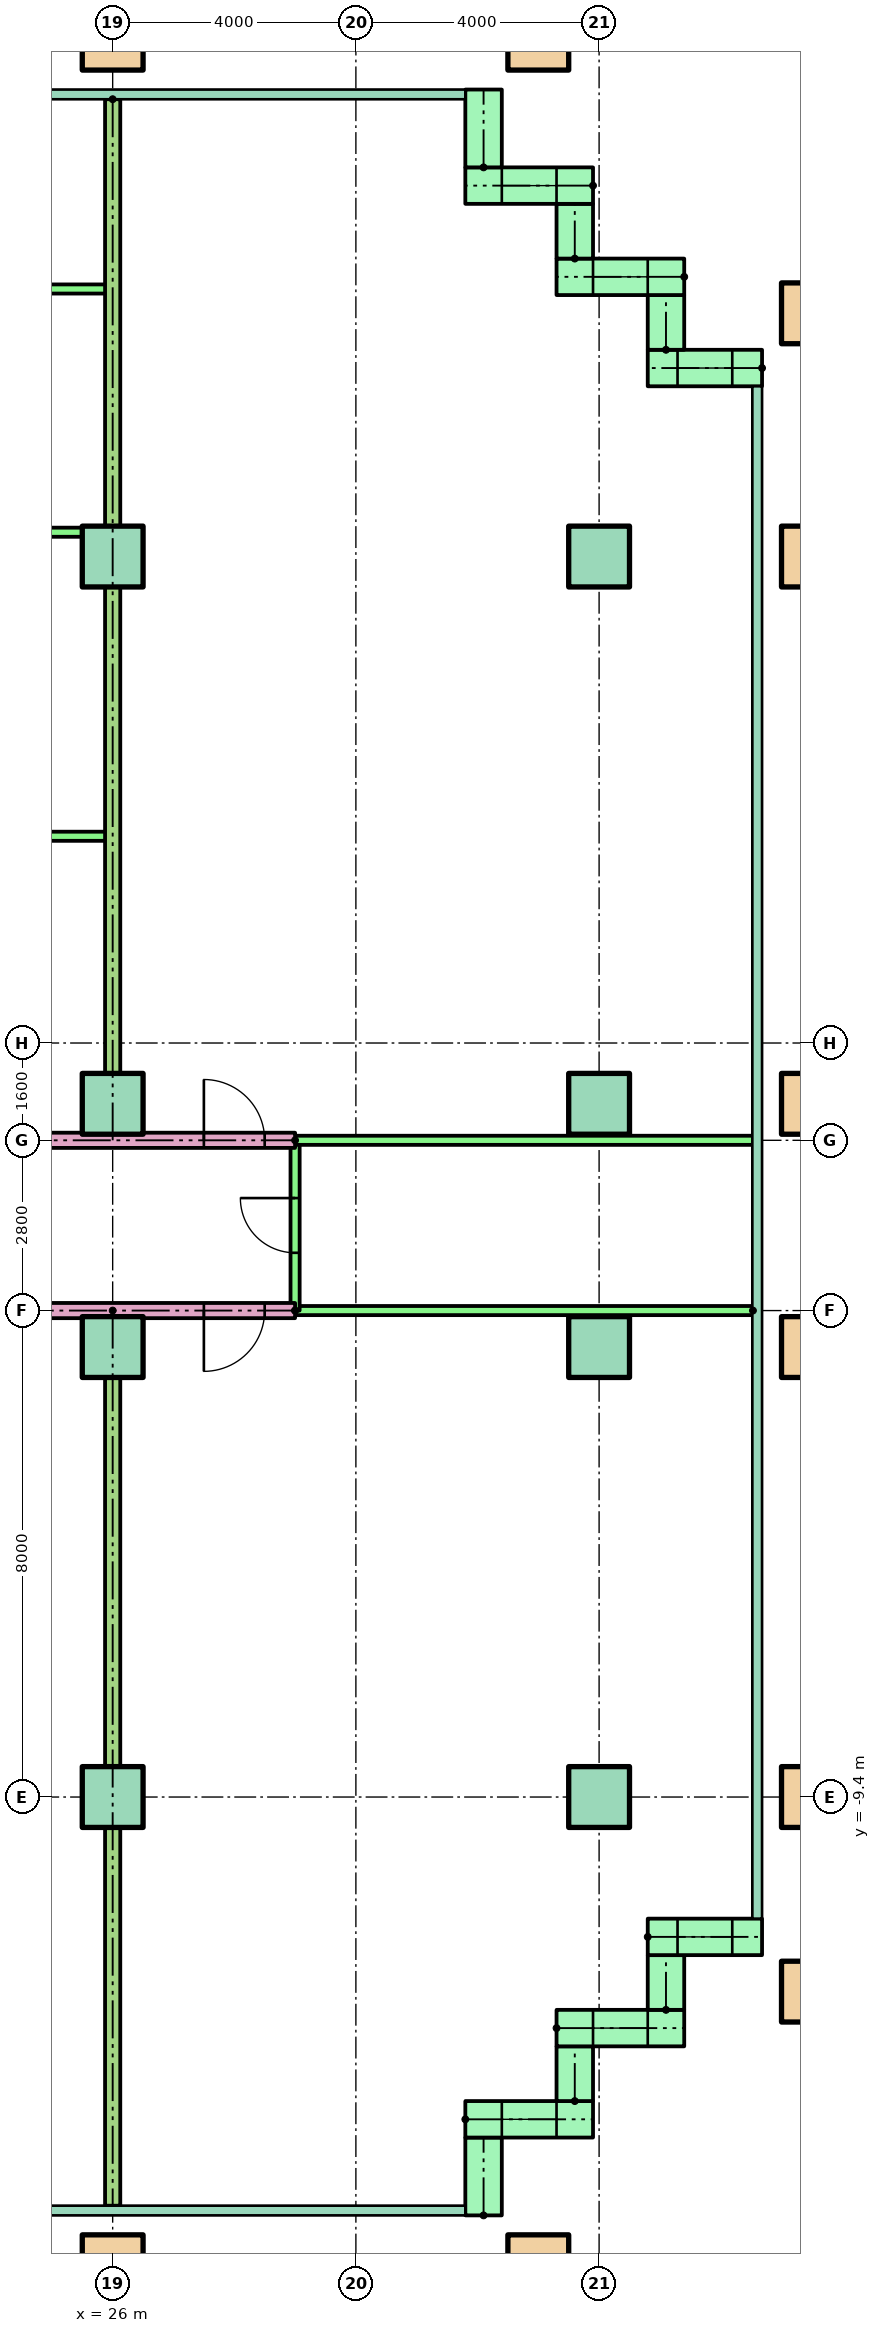
"""IFC4 building model, lengths in metres.
Left out: names, types, materials, properties, quantities, classifications, styles, units other than length and angle.
Written with IfcOpenShell. Run it as: python <this file> out.ifc"""

import sys

from ifc_helpers import new_model, si_unit, direction, frame, frame_2d, origin, origin_2d, place, context, subcontext, project, spatial, rectangle, hollow_rectangle, extrude, element, fill, save


model = new_model("IFC4")
c1 = context("Model", 3, precision=1e-05, world=origin(), true_north=direction((0.0, 1.0)))
c2 = subcontext(c1, "Body", "Model", "MODEL_VIEW")
j1 = project(units=[si_unit("LENGTHUNIT", "METRE"), si_unit("PLANEANGLEUNIT", "RADIAN")], contexts=[c1])
p1 = place(None, origin())
s1 = spatial("IfcSite", under=j1, at=p1, CompositionType="ELEMENT")
p2 = place(p1, origin())
s2 = spatial("IfcBuilding", under=s1, at=p2, CompositionType="ELEMENT")
p3 = place(p2, frame((0.0, 0.0, 33.8)))
s3 = spatial("IfcBuildingStorey", under=s2, at=p3, CompositionType="ELEMENT", Elevation=33.8)
for number, where in (
    (1, (26.0, -17.1, 0.0)),
    (2, (33.0, -17.1, 0.0)),
    (3, (37.5, -12.6, 0.0)),
):
    element("IfcColumn", number, at=place(p3, frame(where)), inside=s3, PredefinedType="COLUMN", context=c2, shape_type="SweptSolid", body=[
        extrude(hollow_rectangle(XDim=1.0, YDim=1.0, WallThickness=0.05, at=origin_2d()), origin(), (0.0, 0.0, 1.0), 3.9),
    ])
for number, where in (
    (4, (26.0, -9.4, 0.0)),
    (5, (34.0, -9.4, 0.0)),
):
    element("IfcColumn", number, at=place(p3, frame(where)), inside=s3, PredefinedType="COLUMN", context=c2, shape_type="SweptSolid", body=[
        extrude(rectangle(XDim=1.0, YDim=1.0, at=origin_2d()), origin(), (0.0, 0.0, 1.0), 3.9),
    ])
p4 = place(p3, frame((37.5, -9.4, 0.0)))
e6 = element("IfcColumn", 6, at=p4, inside=s3, PredefinedType="COLUMN", context=c2, shape_type="SweptSolid", body=[
    extrude(hollow_rectangle(XDim=1.0, YDim=1.0, WallThickness=0.05, at=origin_2d()), origin(), (0.0, 0.0, 1.0), 3.9),
])
for number, where in (
    (7, (26.0, -2.0, 0.0)),
    (8, (34.0, -2.0, 0.0)),
):
    element("IfcColumn", number, at=place(p3, frame(where)), inside=s3, PredefinedType="COLUMN", context=c2, shape_type="SweptSolid", body=[
        extrude(rectangle(XDim=1.0, YDim=1.0, at=origin_2d()), origin(), (0.0, 0.0, 1.0), 3.9),
    ])
p5 = place(p3, frame((37.5, -2.0, 0.0)))
e9 = element("IfcColumn", 9, at=p5, inside=s3, PredefinedType="COLUMN", context=c2, shape_type="SweptSolid", body=[
    extrude(hollow_rectangle(XDim=1.0, YDim=1.0, WallThickness=0.05, at=origin_2d()), origin(), (0.0, 0.0, 1.0), 3.9),
])
for number, where in (
    (10, (26.0, 2.0, 0.0)),
    (11, (34.0, 2.0, 0.0)),
):
    element("IfcColumn", number, at=place(p3, frame(where)), inside=s3, PredefinedType="COLUMN", context=c2, shape_type="SweptSolid", body=[
        extrude(rectangle(XDim=1.0, YDim=1.0, at=origin_2d()), origin(), (0.0, 0.0, 1.0), 3.9),
    ])
p6 = place(p3, frame((37.5, 2.0, 0.0)))
e12 = element("IfcColumn", 12, at=p6, inside=s3, PredefinedType="COLUMN", context=c2, shape_type="SweptSolid", body=[
    extrude(hollow_rectangle(XDim=1.0, YDim=1.0, WallThickness=0.05, at=origin_2d()), origin(), (0.0, 0.0, 1.0), 3.9),
])
for number, where in (
    (13, (26.0, 11.0, 0.0)),
    (14, (34.0, 11.0, 0.0)),
):
    element("IfcColumn", number, at=place(p3, frame(where)), inside=s3, PredefinedType="COLUMN", context=c2, shape_type="SweptSolid", body=[
        extrude(rectangle(XDim=1.0, YDim=1.0, at=origin_2d()), origin(), (0.0, 0.0, 1.0), 3.9),
    ])
for number, where in (
    (15, (37.5, 11.0, 0.0)),
    (16, (37.5, 15.0, 0.0)),
    (17, (26.0, 19.5, 0.0)),
    (18, (33.0, 19.5, 0.0)),
):
    element("IfcColumn", number, at=place(p3, frame(where)), inside=s3, PredefinedType="COLUMN", context=c2, shape_type="SweptSolid", body=[
        extrude(hollow_rectangle(XDim=1.0, YDim=1.0, WallThickness=0.05, at=origin_2d()), origin(), (0.0, 0.0, 1.0), 3.9),
    ])
p7 = place(p3, frame((36.68, 14.1, 0.0), z_axis=(0.0, 0.0, 1.0), x_axis=(-1.0, 0.0, 0.0)))
e19 = element("IfcWall", 19, at=p7, inside=s3, PredefinedType="STANDARD", context=c2, shape_type="SweptSolid", body=[
    extrude(rectangle(XDim=1.88, YDim=0.6, at=frame_2d((0.94, 0.0))), origin(), (0.0, 0.0, 1.0), 3.6),
])
p8 = place(p7, frame((0.49, 0.0, 0.9)))
e20 = element("IfcOpeningElement", 20, at=p8, cuts=e19, PredefinedType="OPENING", context=c2, shape_type="SweptSolid", body=[
    extrude(rectangle(XDim=0.9, YDim=1.8, at=frame_2d((0.45, 0.9))), frame((0.0, 0.31, 0.0), z_axis=(0.0, -1.0, 0.0), x_axis=(1.0, 0.0, 0.0)), (0.0, 0.0, 1.0), 0.62),
])
p9 = place(p3, frame((35.1, 14.4, 0.0), z_axis=(0.0, 0.0, 1.0), x_axis=(0.0, 1.0, 0.0)))
e21 = element("IfcWall", 21, at=p9, inside=s3, PredefinedType="STANDARD", context=c2, shape_type="SweptSolid", body=[
    extrude(rectangle(XDim=0.9, YDim=0.6, at=frame_2d((0.45, 0.0))), origin(), (0.0, 0.0, 1.0), 3.6),
])
p10 = place(p3, frame((35.4, 15.6, 0.0), z_axis=(0.0, 0.0, 1.0), x_axis=(-1.0, 0.0, 0.0)))
e22 = element("IfcWall", 22, at=p10, inside=s3, PredefinedType="STANDARD", context=c2, shape_type="SweptSolid", body=[
    extrude(rectangle(XDim=2.1, YDim=0.6, at=frame_2d((1.05, 0.0))), origin(), (0.0, 0.0, 1.0), 3.6),
])
p11 = place(p10, frame((0.6, 0.0, 0.9)))
e23 = element("IfcOpeningElement", 23, at=p11, cuts=e22, PredefinedType="OPENING", context=c2, shape_type="SweptSolid", body=[
    extrude(rectangle(XDim=0.9, YDim=1.8, at=frame_2d((0.45, 0.9))), frame((0.0, 0.31, 0.0), z_axis=(0.0, -1.0, 0.0), x_axis=(1.0, 0.0, 0.0)), (0.0, 0.0, 1.0), 0.62),
])
p12 = place(p3, frame((33.6, 15.9, 0.0), z_axis=(0.0, 0.0, 1.0), x_axis=(0.0, 1.0, 0.0)))
e24 = element("IfcWall", 24, at=p12, inside=s3, PredefinedType="STANDARD", context=c2, shape_type="SweptSolid", body=[
    extrude(rectangle(XDim=0.9, YDim=0.6, at=frame_2d((0.45, 0.0))), origin(), (0.0, 0.0, 1.0), 3.6),
])
p13 = place(p3, frame((33.9, 17.1, 0.0), z_axis=(0.0, 0.0, 1.0), x_axis=(-1.0, 0.0, 0.0)))
e25 = element("IfcWall", 25, at=p13, inside=s3, PredefinedType="STANDARD", context=c2, shape_type="SweptSolid", body=[
    extrude(rectangle(XDim=2.1, YDim=0.6, at=frame_2d((1.05, 0.0))), origin(), (0.0, 0.0, 1.0), 3.6),
])
p14 = place(p13, frame((0.6, 0.0, 0.9)))
e26 = element("IfcOpeningElement", 26, at=p14, cuts=e25, PredefinedType="OPENING", context=c2, shape_type="SweptSolid", body=[
    extrude(rectangle(XDim=0.9, YDim=1.8, at=frame_2d((0.45, 0.9))), frame((0.0, 0.31, 0.0), z_axis=(0.0, -1.0, 0.0), x_axis=(1.0, 0.0, 0.0)), (0.0, 0.0, 1.0), 0.62),
])
for number, where, z_axis, x_axis in (
    (27, (32.1, 17.4, 0.0), (0.0, 0.0, 1.0), (0.0, 1.0, 0.0)),
    (28, (32.1, -16.28, 0.0), (0.0, 0.0, 1.0), (0.0, 1.0, 0.0)),
):
    element("IfcWall", number, at=place(p3, frame(where, z_axis=z_axis, x_axis=x_axis)), inside=s3, PredefinedType="STANDARD", context=c2, shape_type="SweptSolid", body=[
        extrude(rectangle(XDim=1.28, YDim=0.6, at=frame_2d((0.64, 0.0))), origin(), (0.0, 0.0, 1.0), 3.6),
    ])
p15 = place(p3, frame((31.8, -14.7, 0.0)))
e29 = element("IfcWall", 29, at=p15, inside=s3, PredefinedType="STANDARD", context=c2, shape_type="SweptSolid", body=[
    extrude(rectangle(XDim=2.1, YDim=0.6, at=frame_2d((1.05, 0.0))), origin(), (0.0, 0.0, 1.0), 3.6),
])
p16 = place(p15, frame((0.6, 0.0, 0.9)))
e30 = element("IfcOpeningElement", 30, at=p16, cuts=e29, PredefinedType="OPENING", context=c2, shape_type="SweptSolid", body=[
    extrude(rectangle(XDim=0.9, YDim=1.8, at=frame_2d((0.45, 0.9))), frame((0.0, 0.31, 0.0), z_axis=(0.0, -1.0, 0.0), x_axis=(1.0, 0.0, 0.0)), (0.0, 0.0, 1.0), 0.62),
])
p17 = place(p3, frame((33.6, -14.4, 0.0), z_axis=(0.0, 0.0, 1.0), x_axis=(0.0, 1.0, 0.0)))
e31 = element("IfcWall", 31, at=p17, inside=s3, PredefinedType="STANDARD", context=c2, shape_type="SweptSolid", body=[
    extrude(rectangle(XDim=0.9, YDim=0.6, at=frame_2d((0.45, 0.0))), origin(), (0.0, 0.0, 1.0), 3.6),
])
p18 = place(p3, frame((33.3, -13.2, 0.0)))
e32 = element("IfcWall", 32, at=p18, inside=s3, PredefinedType="STANDARD", context=c2, shape_type="SweptSolid", body=[
    extrude(rectangle(XDim=2.1, YDim=0.6, at=frame_2d((1.05, 0.0))), origin(), (0.0, 0.0, 1.0), 3.6),
])
p19 = place(p18, frame((0.6, 0.0, 0.9)))
e33 = element("IfcOpeningElement", 33, at=p19, cuts=e32, PredefinedType="OPENING", context=c2, shape_type="SweptSolid", body=[
    extrude(rectangle(XDim=0.9, YDim=1.8, at=frame_2d((0.45, 0.9))), frame((0.0, 0.31, 0.0), z_axis=(0.0, -1.0, 0.0), x_axis=(1.0, 0.0, 0.0)), (0.0, 0.0, 1.0), 0.62),
])
p20 = place(p3, frame((35.1, -12.9, 0.0), z_axis=(0.0, 0.0, 1.0), x_axis=(0.0, 1.0, 0.0)))
e34 = element("IfcWall", 34, at=p20, inside=s3, PredefinedType="STANDARD", context=c2, shape_type="SweptSolid", body=[
    extrude(rectangle(XDim=0.9, YDim=0.6, at=frame_2d((0.45, 0.0))), origin(), (0.0, 0.0, 1.0), 3.6),
])
p21 = place(p3, frame((34.8, -11.7, 0.0)))
e35 = element("IfcWall", 35, at=p21, inside=s3, PredefinedType="STANDARD", context=c2, shape_type="SweptSolid", body=[
    extrude(rectangle(XDim=1.88, YDim=0.6, at=frame_2d((0.94, 0.0))), origin(), (0.0, 0.0, 1.0), 3.6),
])
p22 = place(p21, frame((0.49, 0.0, 0.9)))
e36 = element("IfcOpeningElement", 36, at=p22, cuts=e35, PredefinedType="OPENING", context=c2, shape_type="SweptSolid", body=[
    extrude(rectangle(XDim=0.9, YDim=1.8, at=frame_2d((0.45, 0.9))), frame((0.0, 0.31, 0.0), z_axis=(0.0, -1.0, 0.0), x_axis=(1.0, 0.0, 0.0)), (0.0, 0.0, 1.0), 0.62),
])
p23 = place(p3, frame((29.0, -1.4, 0.0), z_axis=(0.0, 0.0, 1.0), x_axis=(-1.0, 0.0, 0.0)))
e37 = element("IfcWall", 37, at=p23, inside=s3, PredefinedType="PARTITIONING", context=c2, shape_type="SweptSolid", body=[
    extrude(rectangle(XDim=15.0, YDim=0.25, at=frame_2d((7.5, 0.0))), origin(), (0.0, 0.0, 1.0), 3.1),
])
p24 = place(p23, frame((12.5, 0.0, 0.0)))
e38 = element("IfcOpeningElement", 38, at=p24, cuts=e37, PredefinedType="OPENING", context=c2, shape_type="SweptSolid", body=[
    extrude(rectangle(XDim=1.0, YDim=2.1, at=frame_2d((0.5, 1.05))), frame((0.0, 0.135, 0.0), z_axis=(0.0, -1.0, 0.0), x_axis=(1.0, 0.0, 0.0)), (0.0, 0.0, 1.0), 0.27),
])
p25 = place(p23, frame((0.5, 0.0, 0.0)))
e39 = element("IfcOpeningElement", 39, at=p25, cuts=e37, PredefinedType="OPENING", context=c2, shape_type="SweptSolid", body=[
    extrude(rectangle(XDim=1.0, YDim=2.1, at=frame_2d((0.5, 1.05))), frame((0.0, 0.135, 0.0), z_axis=(0.0, -1.0, 0.0), x_axis=(1.0, 0.0, 0.0)), (0.0, 0.0, 1.0), 0.27),
])
p26 = place(p3, frame((36.53, -1.4, 0.0), z_axis=(0.0, 0.0, 1.0), x_axis=(-1.0, 0.0, 0.0)))
e40 = element("IfcWall", 40, at=p26, inside=s3, PredefinedType="PARTITIONING", context=c2, shape_type="SweptSolid", body=[
    extrude(rectangle(XDim=7.53, YDim=0.15, at=frame_2d((3.765, 0.0))), origin(), (0.0, 0.0, 1.0), 3.1),
])
p27 = place(p3, frame((29.0, -1.4, 0.0), z_axis=(0.0, 0.0, 1.0), x_axis=(0.0, 1.0, 0.0)))
e41 = element("IfcWall", 41, at=p27, inside=s3, PredefinedType="PARTITIONING", context=c2, shape_type="SweptSolid", body=[
    extrude(rectangle(XDim=2.8, YDim=0.15, at=frame_2d((1.4, 0.0))), origin(), (0.0, 0.0, 1.0), 3.1),
])
p28 = place(p27, frame((0.95, 0.0, 0.0)))
e42 = element("IfcOpeningElement", 42, at=p28, cuts=e41, PredefinedType="OPENING", context=c2, shape_type="SweptSolid", body=[
    extrude(rectangle(XDim=0.9, YDim=2.1, at=frame_2d((0.45, 1.05))), frame((0.0, 0.085, 0.0), z_axis=(0.0, -1.0, 0.0), x_axis=(1.0, 0.0, 0.0)), (0.0, 0.0, 1.0), 0.17),
])
p29 = place(p3, frame((26.0, -1.4, 0.0), z_axis=(0.0, 0.0, 1.0), x_axis=(0.0, -1.0, 0.0)))
e43 = element("IfcWall", 43, at=p29, inside=s3, PredefinedType="PARTITIONING", context=c2, shape_type="SweptSolid", body=[
    extrude(rectangle(XDim=14.721, YDim=0.25, at=frame_2d((7.361, 0.0))), origin(), (0.0, 0.0, 1.0), 3.1),
])
p30 = place(p3, frame((14.0, 1.4, 0.0)))
e44 = element("IfcWall", 44, at=p30, inside=s3, PredefinedType="PARTITIONING", context=c2, shape_type="SweptSolid", body=[
    extrude(rectangle(XDim=15.0, YDim=0.25, at=frame_2d((7.5, 0.0))), origin(), (0.0, 0.0, 1.0), 3.1),
])
p31 = place(p30, frame((1.5, 0.0, 0.0)))
e45 = element("IfcOpeningElement", 45, at=p31, cuts=e44, PredefinedType="OPENING", context=c2, shape_type="SweptSolid", body=[
    extrude(rectangle(XDim=1.0, YDim=2.1, at=frame_2d((0.5, 1.05))), frame((0.0, 0.135, 0.0), z_axis=(0.0, -1.0, 0.0), x_axis=(1.0, 0.0, 0.0)), (0.0, 0.0, 1.0), 0.27),
])
p32 = place(p30, frame((8.3, 0.0, 0.0)))
e46 = element("IfcOpeningElement", 46, at=p32, cuts=e44, PredefinedType="OPENING", context=c2, shape_type="SweptSolid", body=[
    extrude(rectangle(XDim=1.0, YDim=2.1, at=frame_2d((0.5, 1.05))), frame((0.0, 0.135, 0.0), z_axis=(0.0, -1.0, 0.0), x_axis=(1.0, 0.0, 0.0)), (0.0, 0.0, 1.0), 0.27),
])
p33 = place(p30, frame((13.5, 0.0, 0.0)))
e47 = element("IfcOpeningElement", 47, at=p33, cuts=e44, PredefinedType="OPENING", context=c2, shape_type="SweptSolid", body=[
    extrude(rectangle(XDim=1.0, YDim=2.1, at=frame_2d((0.5, 1.05))), frame((0.0, 0.135, 0.0), z_axis=(0.0, -1.0, 0.0), x_axis=(1.0, 0.0, 0.0)), (0.0, 0.0, 1.0), 0.27),
])
p34 = place(p3, frame((29.0, 1.4, 0.0)))
e48 = element("IfcWall", 48, at=p34, inside=s3, PredefinedType="PARTITIONING", context=c2, shape_type="SweptSolid", body=[
    extrude(rectangle(XDim=7.53, YDim=0.15, at=frame_2d((3.765, 0.0))), origin(), (0.0, 0.0, 1.0), 3.1),
])
for number, where in (
    (49, (23.6, 6.4, 0.0)),
    (50, (23.6, 11.4, 0.0)),
    (51, (23.6, 15.4, 0.0)),
):
    element("IfcWall", number, at=place(p3, frame(where)), inside=s3, PredefinedType="PARTITIONING", context=c2, shape_type="SweptSolid", body=[
        extrude(rectangle(XDim=2.4, YDim=0.15, at=frame_2d((1.2, 0.0))), origin(), (0.0, 0.0, 1.0), 3.1),
    ])
p35 = place(p3, frame((26.0, 18.521, 0.0), z_axis=(0.0, 0.0, 1.0), x_axis=(0.0, -1.0, 0.0)))
e52 = element("IfcWall", 52, at=p35, inside=s3, PredefinedType="PARTITIONING", context=c2, shape_type="SweptSolid", body=[
    extrude(rectangle(XDim=17.121, YDim=0.25, at=frame_2d((8.561, 0.0))), origin(), (0.0, 0.0, 1.0), 3.1),
])
p36 = place(p8, origin())
e53 = element("IfcWindow", 53, at=p36, inside=s3, PartitioningType="SINGLE_PANEL", PredefinedType="WINDOW", context=c2, shape_type="SweptSolid", body=[
    extrude(rectangle(XDim=0.9, YDim=1.8, at=frame_2d((0.45, 0.9))), frame((0.0, 0.03, 0.0), z_axis=(0.0, -1.0, 0.0), x_axis=(1.0, 0.0, 0.0)), (0.0, 0.0, 1.0), 0.06),
])
fill(e20, e53)
p37 = place(p11, origin())
e54 = element("IfcWindow", 54, at=p37, inside=s3, PartitioningType="SINGLE_PANEL", PredefinedType="WINDOW", context=c2, shape_type="SweptSolid", body=[
    extrude(rectangle(XDim=0.9, YDim=1.8, at=frame_2d((0.45, 0.9))), frame((0.0, 0.03, 0.0), z_axis=(0.0, -1.0, 0.0), x_axis=(1.0, 0.0, 0.0)), (0.0, 0.0, 1.0), 0.06),
])
fill(e23, e54)
p38 = place(p14, origin())
e55 = element("IfcWindow", 55, at=p38, inside=s3, PartitioningType="SINGLE_PANEL", PredefinedType="WINDOW", context=c2, shape_type="SweptSolid", body=[
    extrude(rectangle(XDim=0.9, YDim=1.8, at=frame_2d((0.45, 0.9))), frame((0.0, 0.03, 0.0), z_axis=(0.0, -1.0, 0.0), x_axis=(1.0, 0.0, 0.0)), (0.0, 0.0, 1.0), 0.06),
])
fill(e26, e55)
p39 = place(p16, origin())
e56 = element("IfcWindow", 56, at=p39, inside=s3, PartitioningType="SINGLE_PANEL", PredefinedType="WINDOW", context=c2, shape_type="SweptSolid", body=[
    extrude(rectangle(XDim=0.9, YDim=1.8, at=frame_2d((0.45, 0.9))), frame((0.0, 0.03, 0.0), z_axis=(0.0, -1.0, 0.0), x_axis=(1.0, 0.0, 0.0)), (0.0, 0.0, 1.0), 0.06),
])
fill(e30, e56)
p40 = place(p19, origin())
e57 = element("IfcWindow", 57, at=p40, inside=s3, PartitioningType="SINGLE_PANEL", PredefinedType="WINDOW", context=c2, shape_type="SweptSolid", body=[
    extrude(rectangle(XDim=0.9, YDim=1.8, at=frame_2d((0.45, 0.9))), frame((0.0, 0.03, 0.0), z_axis=(0.0, -1.0, 0.0), x_axis=(1.0, 0.0, 0.0)), (0.0, 0.0, 1.0), 0.06),
])
fill(e33, e57)
p41 = place(p22, origin())
e58 = element("IfcWindow", 58, at=p41, inside=s3, PartitioningType="SINGLE_PANEL", PredefinedType="WINDOW", context=c2, shape_type="SweptSolid", body=[
    extrude(rectangle(XDim=0.9, YDim=1.8, at=frame_2d((0.45, 0.9))), frame((0.0, 0.03, 0.0), z_axis=(0.0, -1.0, 0.0), x_axis=(1.0, 0.0, 0.0)), (0.0, 0.0, 1.0), 0.06),
])
fill(e36, e58)
p42 = place(p25, origin())
e59 = element("IfcDoor", 59, at=p42, inside=s3, OperationType="SINGLE_SWING_RIGHT", PredefinedType="DOOR", context=c2, shape_type="SweptSolid", body=[
    extrude(rectangle(XDim=1.0, YDim=2.1, at=frame_2d((0.5, 1.05))), frame((0.0, 0.025, 0.0), z_axis=(0.0, -1.0, 0.0), x_axis=(1.0, 0.0, 0.0)), (0.0, 0.0, 1.0), 0.05),
])
fill(e39, e59)
p43 = place(p28, origin())
e60 = element("IfcDoor", 60, at=p43, inside=s3, OperationType="SINGLE_SWING_RIGHT", PredefinedType="DOOR", context=c2, shape_type="SweptSolid", body=[
    extrude(rectangle(XDim=0.9, YDim=2.1, at=frame_2d((0.45, 1.05))), frame((0.0, 0.025, 0.0), z_axis=(0.0, -1.0, 0.0), x_axis=(1.0, 0.0, 0.0)), (0.0, 0.0, 1.0), 0.05),
])
fill(e42, e60)
p44 = place(p33, origin())
e61 = element("IfcDoor", 61, at=p44, inside=s3, OperationType="SINGLE_SWING_LEFT", PredefinedType="DOOR", context=c2, shape_type="SweptSolid", body=[
    extrude(rectangle(XDim=1.0, YDim=2.1, at=frame_2d((0.5, 1.05))), frame((0.0, 0.025, 0.0), z_axis=(0.0, -1.0, 0.0), x_axis=(1.0, 0.0, 0.0)), (0.0, 0.0, 1.0), 0.05),
])
fill(e47, e61)
save(model, sys.argv[1])
